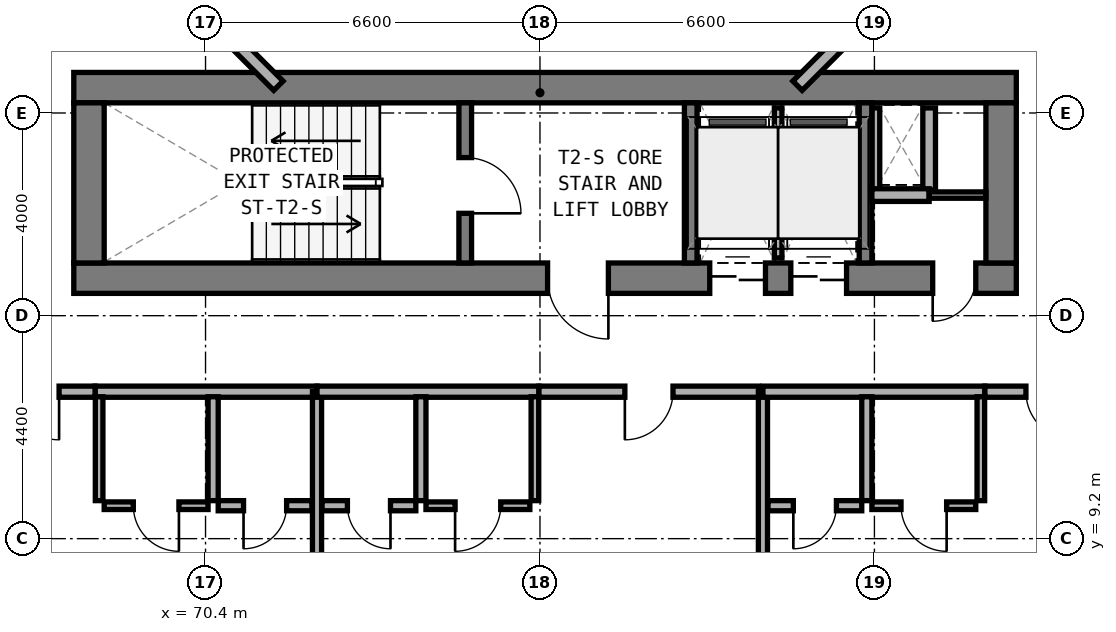
"""IFC4 building model, lengths in metres.
Left out: names, types, materials, properties, quantities, classifications, styles, units other than length and angle.
Written with IfcOpenShell. Run it as: python <this file> out.ifc"""

import sys

from ifc_helpers import new_model, si_unit, direction, frame, frame_2d, origin, place, context, subcontext, project, spatial, rectangle, extrude, element, fill, save


model = new_model("IFC4")
c1 = context("Model", 3, precision=1e-05, world=origin(), true_north=direction((0.0, 1.0)))
c2 = subcontext(c1, "Body", "Model", "MODEL_VIEW")
j1 = project(units=[si_unit("LENGTHUNIT", "METRE"), si_unit("PLANEANGLEUNIT", "RADIAN")], contexts=[c1])
p1 = place(None, origin())
s1 = spatial("IfcSite", under=j1, at=p1, CompositionType="ELEMENT")
p2 = place(p1, origin())
s2 = spatial("IfcBuilding", under=s1, at=p2, CompositionType="ELEMENT")
p3 = place(p2, frame((0.0, 0.0, 38.0)))
s3 = spatial("IfcBuildingStorey", under=s2, at=p3, CompositionType="ELEMENT", Elevation=38.0)
p4 = place(p3, frame((67.8, 14.34, 0.0), z_axis=(0.0, 0.0, 1.0), x_axis=(1.0, 0.0, 0.0)))
e1 = element("IfcWall", 1, at=p4, inside=s3, PredefinedType="SHEAR", context=c2, shape_type="SweptSolid", body=[
    extrude(rectangle(XDim=18.6, YDim=0.6, at=frame_2d((9.3, 0.0))), origin(), (0.0, 0.0, 1.0), 3.5),
])
p5 = place(p4, frame((9.35, 0.0, 0.0)))
e2 = element("IfcOpeningElement", 2, at=p5, cuts=e1, PredefinedType="OPENING", context=c2, shape_type="SweptSolid", body=[
    extrude(rectangle(XDim=1.2, YDim=2.15, at=frame_2d((0.6, 1.075))), frame((0.0, 0.31, 0.0), z_axis=(0.0, -1.0, 0.0), x_axis=(1.0, 0.0, 0.0)), (0.0, 0.0, 1.0), 0.62),
])
p6 = place(p4, frame((16.95, 0.0, 0.0)))
e3 = element("IfcOpeningElement", 3, at=p6, cuts=e1, PredefinedType="OPENING", context=c2, shape_type="SweptSolid", body=[
    extrude(rectangle(XDim=0.85, YDim=2.1, at=frame_2d((0.425, 1.05))), frame((0.0, 0.31, 0.0), z_axis=(0.0, -1.0, 0.0), x_axis=(1.0, 0.0, 0.0)), (0.0, 0.0, 1.0), 0.62),
])
p7 = place(p4, frame((12.55, 0.0, 0.0)))
e4 = element("IfcOpeningElement", 4, at=p7, cuts=e1, PredefinedType="OPENING", context=c2, shape_type="SweptSolid", body=[
    extrude(rectangle(XDim=1.1, YDim=2.15, at=frame_2d((0.55, 1.075))), frame((0.0, 0.31, 0.0), z_axis=(0.0, -1.0, 0.0), x_axis=(1.0, 0.0, 0.0)), (0.0, 0.0, 1.0), 0.62),
])
p8 = place(p4, frame((14.15, 0.0, 0.0)))
e5 = element("IfcOpeningElement", 5, at=p8, cuts=e1, PredefinedType="OPENING", context=c2, shape_type="SweptSolid", body=[
    extrude(rectangle(XDim=1.1, YDim=2.15, at=frame_2d((0.55, 1.075))), frame((0.0, 0.31, 0.0), z_axis=(0.0, -1.0, 0.0), x_axis=(1.0, 0.0, 0.0)), (0.0, 0.0, 1.0), 0.62),
])
p9 = place(p3, frame((67.8, 18.1, 0.0), z_axis=(0.0, 0.0, 1.0), x_axis=(1.0, 0.0, 0.0)))
e6 = element("IfcWall", 6, at=p9, inside=s3, PredefinedType="SHEAR", context=c2, shape_type="SweptSolid", body=[
    extrude(rectangle(XDim=18.6, YDim=0.6, at=frame_2d((9.3, 0.0))), origin(), (0.0, 0.0, 1.0), 3.5),
])
for number, where, z_axis, x_axis in (
    (7, (68.1, 14.64, 0.0), (0.0, 0.0, 1.0), (0.0, 1.0, 0.0)),
    (8, (86.1, 14.64, 0.0), (0.0, 0.0, 1.0), (0.0, 1.0, 0.0)),
):
    element("IfcWall", number, at=place(p3, frame(where, z_axis=z_axis, x_axis=x_axis)), inside=s3, PredefinedType="SHEAR", context=c2, shape_type="SweptSolid", body=[
        extrude(rectangle(XDim=3.16, YDim=0.6, at=frame_2d((1.58, 0.0))), origin(), (0.0, 0.0, 1.0), 3.5),
    ])
p10 = place(p3, frame((75.525, 14.64, 0.0), z_axis=(0.0, 0.0, 1.0), x_axis=(0.0, 1.0, 0.0)))
e9 = element("IfcWall", 9, at=p10, inside=s3, PredefinedType="STANDARD", context=c2, shape_type="SweptSolid", body=[
    extrude(rectangle(XDim=3.16, YDim=0.25, at=frame_2d((1.58, 0.0))), origin(), (0.0, 0.0, 1.0), 3.25),
])
p11 = place(p10, frame((0.98, 0.0, 0.0)))
e10 = element("IfcOpeningElement", 10, at=p11, cuts=e9, PredefinedType="OPENING", context=c2, shape_type="SweptSolid", body=[
    extrude(rectangle(XDim=1.1, YDim=2.15, at=frame_2d((0.55, 1.075))), frame((0.0, 0.135, 0.0), z_axis=(0.0, -1.0, 0.0), x_axis=(1.0, 0.0, 0.0)), (0.0, 0.0, 1.0), 0.27),
])
for number, where, z_axis, x_axis in (
    (11, (79.975, 14.64, 0.0), (0.0, 0.0, 1.0), (0.0, 1.0, 0.0)),
    (12, (83.425, 14.64, 0.0), (0.0, 0.0, 1.0), (0.0, 1.0, 0.0)),
):
    element("IfcWall", number, at=place(p3, frame(where, z_axis=z_axis, x_axis=x_axis)), inside=s3, PredefinedType="STANDARD", context=c2, shape_type="SweptSolid", body=[
        extrude(rectangle(XDim=3.16, YDim=0.25, at=frame_2d((1.58, 0.0))), origin(), (0.0, 0.0, 1.0), 3.25),
    ])
for number, where, z_axis, x_axis in (
    (13, (82.082, 18.138, 0.0), (0.0, 0.0, 1.0), (0.707, 0.707, 0.0)),
    (14, (70.204, 19.772, 0.0), (0.0, 0.0, 1.0), (0.707, -0.707, 0.0)),
):
    element("IfcWall", number, at=place(p3, frame(where, z_axis=z_axis, x_axis=x_axis)), inside=s3, PredefinedType="STANDARD", context=c2, shape_type="SweptSolid", body=[
        extrude(rectangle(XDim=2.311, YDim=0.26, at=frame_2d((1.155, 0.0))), origin(), (0.0, 0.0, 1.0), 3.25),
    ])
p12 = place(p3, frame((83.63, 16.08, 0.0), z_axis=(0.0, 0.0, 1.0), x_axis=(0.0, 1.0, 0.0)))
e15 = element("IfcWall", 15, at=p12, inside=s3, PredefinedType="PARTITIONING", context=c2, shape_type="SweptSolid", body=[
    extrude(rectangle(XDim=1.62, YDim=0.15, at=frame_2d((0.81, 0.0))), origin(), (0.0, 0.0, 1.0), 2.725),
])
p13 = place(p3, frame((84.68, 16.08, 0.0), z_axis=(0.0, 0.0, 1.0), x_axis=(0.0, 1.0, 0.0)))
e16 = element("IfcWall", 16, at=p13, inside=s3, PredefinedType="SOLIDWALL", context=c2, shape_type="SweptSolid", body=[
    extrude(rectangle(XDim=1.62, YDim=0.25, at=frame_2d((0.81, 0.0))), origin(), (0.0, 0.0, 1.0), 3.22),
])
p14 = place(p3, frame((83.55, 15.98, 0.0), z_axis=(0.0, 0.0, 1.0), x_axis=(1.0, 0.0, 0.0)))
e17 = element("IfcWall", 17, at=p14, inside=s3, PredefinedType="SOLIDWALL", context=c2, shape_type="SweptSolid", body=[
    extrude(rectangle(XDim=1.13, YDim=0.25, at=frame_2d((0.565, 0.0))), origin(), (0.0, 0.0, 1.0), 3.22),
])
p15 = place(p3, frame((84.68, 15.98, 0.0), z_axis=(0.0, 0.0, 1.0), x_axis=(1.0, 0.0, 0.0)))
e18 = element("IfcWall", 18, at=p15, inside=s3, PredefinedType="PARTITIONING", context=c2, shape_type="SweptSolid", body=[
    extrude(rectangle(XDim=1.12, YDim=0.125, at=frame_2d((0.56, 0.0))), origin(), (0.0, 0.0, 1.0), 3.22),
])
p16 = place(p3, frame((81.7, 14.74, 0.0), z_axis=(0.0, 0.0, 1.0), x_axis=(0.0, 1.0, 0.0)))
e19 = element("IfcWall", 19, at=p16, inside=s3, PredefinedType="PARTITIONING", context=c2, shape_type="SweptSolid", body=[
    extrude(rectangle(XDim=2.96, YDim=0.15, at=frame_2d((1.48, 0.0))), origin(), (0.0, 0.0, 1.0), 3.22),
])
p17 = place(p3, frame((68.22, 12.1, 0.0), z_axis=(0.0, 0.0, 1.0), x_axis=(1.0, 0.0, 0.0)))
e20 = element("IfcWall", 20, at=p17, inside=s3, PredefinedType="SOLIDWALL", context=c2, shape_type="SweptSolid", body=[
    extrude(rectangle(XDim=4.38, YDim=0.22, at=frame_2d((2.19, 0.0))), origin(), (0.0, 0.0, 1.0), 2.725),
])
p18 = place(p3, frame((65.85, 12.1, 0.0), z_axis=(0.0, 0.0, 1.0), x_axis=(1.0, 0.0, 0.0)))
e21 = element("IfcWall", 21, at=p18, inside=s3, PredefinedType="SOLIDWALL", context=c2, shape_type="SweptSolid", body=[
    extrude(rectangle(XDim=2.37, YDim=0.22, at=frame_2d((1.185, 0.0))), origin(), (0.0, 0.0, 1.0), 3.22),
])
p19 = place(p18, frame((0.71, 0.0, 0.0)))
e22 = element("IfcOpeningElement", 22, at=p19, cuts=e21, PredefinedType="OPENING", context=c2, shape_type="SweptSolid", body=[
    extrude(rectangle(XDim=0.95, YDim=2.1, at=frame_2d((0.475, 1.05))), frame((0.0, 0.12, 0.0), z_axis=(0.0, -1.0, 0.0), x_axis=(1.0, 0.0, 0.0)), (0.0, 0.0, 1.0), 0.24),
])
p20 = place(p3, frame((70.55, 9.95, 0.0), z_axis=(0.0, 0.0, 1.0), x_axis=(0.0, 1.0, 0.0)))
e23 = element("IfcWall", 23, at=p20, inside=s3, PredefinedType="PLUMBINGWALL", context=c2, shape_type="SweptSolid", body=[
    extrude(rectangle(XDim=2.05, YDim=0.2, at=frame_2d((1.025, 0.0))), origin(), (0.0, 0.0, 1.0), 3.22),
])
p21 = place(p3, frame((68.3, 9.95, 0.0), z_axis=(0.0, 0.0, 1.0), x_axis=(0.0, 1.0, 0.0)))
e24 = element("IfcWall", 24, at=p21, inside=s3, PredefinedType="PARTITIONING", context=c2, shape_type="SweptSolid", body=[
    extrude(rectangle(XDim=2.05, YDim=0.15, at=frame_2d((1.025, 0.0))), origin(), (0.0, 0.0, 1.0), 3.22),
])
p22 = place(p3, frame((70.65, 9.85, 0.0), z_axis=(0.0, 0.0, 1.0), x_axis=(1.0, 0.0, 0.0)))
e25 = element("IfcWall", 25, at=p22, inside=s3, PredefinedType="PLUMBINGWALL", context=c2, shape_type="SweptSolid", body=[
    extrude(rectangle(XDim=1.85, YDim=0.2, at=frame_2d((0.925, 0.0))), origin(), (0.0, 0.0, 1.0), 3.22),
])
p23 = place(p22, frame((0.5, 0.0, 0.0)))
e26 = element("IfcOpeningElement", 26, at=p23, cuts=e25, PredefinedType="OPENING", context=c2, shape_type="SweptSolid", body=[
    extrude(rectangle(XDim=0.85, YDim=2.1, at=frame_2d((0.425, 1.05))), frame((0.0, 0.11, 0.0), z_axis=(0.0, -1.0, 0.0), x_axis=(1.0, 0.0, 0.0)), (0.0, 0.0, 1.0), 0.22),
])
p24 = place(p3, frame((68.4, 9.85, 0.0), z_axis=(0.0, 0.0, 1.0), x_axis=(1.0, 0.0, 0.0)))
e27 = element("IfcWall", 27, at=p24, inside=s3, PredefinedType="PARTITIONING", context=c2, shape_type="SweptSolid", body=[
    extrude(rectangle(XDim=2.05, YDim=0.15, at=frame_2d((1.025, 0.0))), origin(), (0.0, 0.0, 1.0), 3.22),
])
p25 = place(p24, frame((0.575, 0.0, 0.0)))
e28 = element("IfcOpeningElement", 28, at=p25, cuts=e27, PredefinedType="OPENING", context=c2, shape_type="SweptSolid", body=[
    extrude(rectangle(XDim=0.9, YDim=2.1, at=frame_2d((0.45, 1.05))), frame((0.0, 0.085, 0.0), z_axis=(0.0, -1.0, 0.0), x_axis=(1.0, 0.0, 0.0)), (0.0, 0.0, 1.0), 0.17),
])
p26 = place(p3, frame((72.6, 5.06, 0.0), z_axis=(0.0, 0.0, 1.0), x_axis=(0.0, 1.0, 0.0)))
e29 = element("IfcWall", 29, at=p26, inside=s3, PredefinedType="SOLIDWALL", context=c2, shape_type="SweptSolid", body=[
    extrude(rectangle(XDim=7.04, YDim=0.18, at=frame_2d((3.52, 0.0))), origin(), (0.0, 0.0, 1.0), 2.725),
])
p27 = place(p3, frame((72.6, 12.1, 0.0), z_axis=(0.0, 0.0, 1.0), x_axis=(1.0, 0.0, 0.0)))
e30 = element("IfcWall", 30, at=p27, inside=s3, PredefinedType="SOLIDWALL", context=c2, shape_type="SweptSolid", body=[
    extrude(rectangle(XDim=4.38, YDim=0.22, at=frame_2d((2.19, 0.0))), origin(), (0.0, 0.0, 1.0), 2.725),
])
p28 = place(p3, frame((76.98, 12.1, 0.0), z_axis=(0.0, 0.0, 1.0), x_axis=(1.0, 0.0, 0.0)))
e31 = element("IfcWall", 31, at=p28, inside=s3, PredefinedType="SOLIDWALL", context=c2, shape_type="SweptSolid", body=[
    extrude(rectangle(XDim=4.34, YDim=0.22, at=frame_2d((2.17, 0.0))), origin(), (0.0, 0.0, 1.0), 2.725),
])
p29 = place(p28, frame((1.695, 0.0, 0.0)))
e32 = element("IfcOpeningElement", 32, at=p29, cuts=e31, PredefinedType="OPENING", context=c2, shape_type="SweptSolid", body=[
    extrude(rectangle(XDim=0.95, YDim=2.1, at=frame_2d((0.475, 1.05))), frame((0.0, 0.12, 0.0), z_axis=(0.0, -1.0, 0.0), x_axis=(1.0, 0.0, 0.0)), (0.0, 0.0, 1.0), 0.24),
])
p30 = place(p3, frame((74.65, 9.95, 0.0), z_axis=(0.0, 0.0, 1.0), x_axis=(0.0, 1.0, 0.0)))
e33 = element("IfcWall", 33, at=p30, inside=s3, PredefinedType="PLUMBINGWALL", context=c2, shape_type="SweptSolid", body=[
    extrude(rectangle(XDim=2.05, YDim=0.2, at=frame_2d((1.025, 0.0))), origin(), (0.0, 0.0, 1.0), 2.895),
])
p31 = place(p3, frame((76.9, 9.95, 0.0), z_axis=(0.0, 0.0, 1.0), x_axis=(0.0, 1.0, 0.0)))
e34 = element("IfcWall", 34, at=p31, inside=s3, PredefinedType="PARTITIONING", context=c2, shape_type="SweptSolid", body=[
    extrude(rectangle(XDim=2.05, YDim=0.15, at=frame_2d((1.025, 0.0))), origin(), (0.0, 0.0, 1.0), 2.895),
])
p32 = place(p3, frame((72.7, 9.85, 0.0), z_axis=(0.0, 0.0, 1.0), x_axis=(1.0, 0.0, 0.0)))
e35 = element("IfcWall", 35, at=p32, inside=s3, PredefinedType="PLUMBINGWALL", context=c2, shape_type="SweptSolid", body=[
    extrude(rectangle(XDim=1.85, YDim=0.2, at=frame_2d((0.925, 0.0))), origin(), (0.0, 0.0, 1.0), 3.22),
])
p33 = place(p32, frame((0.5, 0.0, 0.0)))
e36 = element("IfcOpeningElement", 36, at=p33, cuts=e35, PredefinedType="OPENING", context=c2, shape_type="SweptSolid", body=[
    extrude(rectangle(XDim=0.85, YDim=2.1, at=frame_2d((0.425, 1.05))), frame((0.0, 0.11, 0.0), z_axis=(0.0, -1.0, 0.0), x_axis=(1.0, 0.0, 0.0)), (0.0, 0.0, 1.0), 0.22),
])
p34 = place(p3, frame((74.75, 9.85, 0.0), z_axis=(0.0, 0.0, 1.0), x_axis=(1.0, 0.0, 0.0)))
e37 = element("IfcWall", 37, at=p34, inside=s3, PredefinedType="PARTITIONING", context=c2, shape_type="SweptSolid", body=[
    extrude(rectangle(XDim=2.05, YDim=0.15, at=frame_2d((1.025, 0.0))), origin(), (0.0, 0.0, 1.0), 3.22),
])
p35 = place(p34, frame((0.575, 0.0, 0.0)))
e38 = element("IfcOpeningElement", 38, at=p35, cuts=e37, PredefinedType="OPENING", context=c2, shape_type="SweptSolid", body=[
    extrude(rectangle(XDim=0.9, YDim=2.1, at=frame_2d((0.45, 1.05))), frame((0.0, 0.085, 0.0), z_axis=(0.0, -1.0, 0.0), x_axis=(1.0, 0.0, 0.0)), (0.0, 0.0, 1.0), 0.17),
])
p36 = place(p3, frame((81.4, 5.06, 0.0), z_axis=(0.0, 0.0, 1.0), x_axis=(0.0, 1.0, 0.0)))
e39 = element("IfcWall", 39, at=p36, inside=s3, PredefinedType="SOLIDWALL", context=c2, shape_type="SweptSolid", body=[
    extrude(rectangle(XDim=7.04, YDim=0.18, at=frame_2d((3.52, 0.0))), origin(), (0.0, 0.0, 1.0), 2.725),
])
p37 = place(p3, frame((81.4, 12.1, 0.0), z_axis=(0.0, 0.0, 1.0), x_axis=(1.0, 0.0, 0.0)))
e40 = element("IfcWall", 40, at=p37, inside=s3, PredefinedType="SOLIDWALL", context=c2, shape_type="SweptSolid", body=[
    extrude(rectangle(XDim=4.38, YDim=0.22, at=frame_2d((2.19, 0.0))), origin(), (0.0, 0.0, 1.0), 2.725),
])
p38 = place(p3, frame((85.78, 12.1, 0.0), z_axis=(0.0, 0.0, 1.0), x_axis=(1.0, 0.0, 0.0)))
e41 = element("IfcWall", 41, at=p38, inside=s3, PredefinedType="SOLIDWALL", context=c2, shape_type="SweptSolid", body=[
    extrude(rectangle(XDim=2.57, YDim=0.22, at=frame_2d((1.285, 0.0))), origin(), (0.0, 0.0, 1.0), 3.22),
])
p39 = place(p38, frame((0.81, 0.0, 0.0)))
e42 = element("IfcOpeningElement", 42, at=p39, cuts=e41, PredefinedType="OPENING", context=c2, shape_type="SweptSolid", body=[
    extrude(rectangle(XDim=0.95, YDim=2.1, at=frame_2d((0.475, 1.05))), frame((0.0, 0.12, 0.0), z_axis=(0.0, -1.0, 0.0), x_axis=(1.0, 0.0, 0.0)), (0.0, 0.0, 1.0), 0.24),
])
p40 = place(p3, frame((83.45, 9.95, 0.0), z_axis=(0.0, 0.0, 1.0), x_axis=(0.0, 1.0, 0.0)))
e43 = element("IfcWall", 43, at=p40, inside=s3, PredefinedType="PLUMBINGWALL", context=c2, shape_type="SweptSolid", body=[
    extrude(rectangle(XDim=2.05, YDim=0.2, at=frame_2d((1.025, 0.0))), origin(), (0.0, 0.0, 1.0), 3.22),
])
p41 = place(p3, frame((85.7, 9.95, 0.0), z_axis=(0.0, 0.0, 1.0), x_axis=(0.0, 1.0, 0.0)))
e44 = element("IfcWall", 44, at=p41, inside=s3, PredefinedType="PARTITIONING", context=c2, shape_type="SweptSolid", body=[
    extrude(rectangle(XDim=2.05, YDim=0.15, at=frame_2d((1.025, 0.0))), origin(), (0.0, 0.0, 1.0), 3.22),
])
p42 = place(p3, frame((81.5, 9.85, 0.0), z_axis=(0.0, 0.0, 1.0), x_axis=(1.0, 0.0, 0.0)))
e45 = element("IfcWall", 45, at=p42, inside=s3, PredefinedType="PLUMBINGWALL", context=c2, shape_type="SweptSolid", body=[
    extrude(rectangle(XDim=1.85, YDim=0.2, at=frame_2d((0.925, 0.0))), origin(), (0.0, 0.0, 1.0), 2.725),
])
p43 = place(p42, frame((0.5, 0.0, 0.0)))
e46 = element("IfcOpeningElement", 46, at=p43, cuts=e45, PredefinedType="OPENING", context=c2, shape_type="SweptSolid", body=[
    extrude(rectangle(XDim=0.85, YDim=2.1, at=frame_2d((0.425, 1.05))), frame((0.0, 0.11, 0.0), z_axis=(0.0, -1.0, 0.0), x_axis=(1.0, 0.0, 0.0)), (0.0, 0.0, 1.0), 0.22),
])
p44 = place(p3, frame((83.55, 9.85, 0.0), z_axis=(0.0, 0.0, 1.0), x_axis=(1.0, 0.0, 0.0)))
e47 = element("IfcWall", 47, at=p44, inside=s3, PredefinedType="PARTITIONING", context=c2, shape_type="SweptSolid", body=[
    extrude(rectangle(XDim=2.05, YDim=0.15, at=frame_2d((1.025, 0.0))), origin(), (0.0, 0.0, 1.0), 3.22),
])
p45 = place(p44, frame((0.575, 0.0, 0.0)))
e48 = element("IfcOpeningElement", 48, at=p45, cuts=e47, PredefinedType="OPENING", context=c2, shape_type="SweptSolid", body=[
    extrude(rectangle(XDim=0.9, YDim=2.1, at=frame_2d((0.45, 1.05))), frame((0.0, 0.085, 0.0), z_axis=(0.0, -1.0, 0.0), x_axis=(1.0, 0.0, 0.0)), (0.0, 0.0, 1.0), 0.17),
])
p46 = place(p11, frame((1.1, 0.0, 0.0), z_axis=(0.0, 0.0, 1.0), x_axis=(-1.0, 0.0, 0.0)))
e49 = element("IfcDoor", 49, at=p46, inside=s3, OperationType="SINGLE_SWING_RIGHT", PredefinedType="DOOR", context=c2, shape_type="SweptSolid", body=[
    extrude(rectangle(XDim=1.1, YDim=2.15, at=frame_2d((0.55, 1.075))), frame((0.0, 0.025, 0.0), z_axis=(0.0, -1.0, 0.0), x_axis=(1.0, 0.0, 0.0)), (0.0, 0.0, 1.0), 0.05),
])
fill(e10, e49)
p47 = place(p5, frame((1.2, 0.0, 0.0), z_axis=(0.0, 0.0, 1.0), x_axis=(-1.0, 0.0, 0.0)))
e50 = element("IfcDoor", 50, at=p47, inside=s3, OperationType="SINGLE_SWING_LEFT", PredefinedType="DOOR", context=c2, shape_type="SweptSolid", body=[
    extrude(rectangle(XDim=1.2, YDim=2.15, at=frame_2d((0.6, 1.075))), frame((0.0, 0.025, 0.0), z_axis=(0.0, -1.0, 0.0), x_axis=(1.0, 0.0, 0.0)), (0.0, 0.0, 1.0), 0.05),
])
fill(e2, e50)
p48 = place(p6, frame((0.85, 0.0, 0.0), z_axis=(0.0, 0.0, 1.0), x_axis=(-1.0, 0.0, 0.0)))
e51 = element("IfcDoor", 51, at=p48, inside=s3, OperationType="SINGLE_SWING_RIGHT", PredefinedType="DOOR", context=c2, shape_type="SweptSolid", body=[
    extrude(rectangle(XDim=0.85, YDim=2.1, at=frame_2d((0.425, 1.05))), frame((0.0, 0.025, 0.0), z_axis=(0.0, -1.0, 0.0), x_axis=(1.0, 0.0, 0.0)), (0.0, 0.0, 1.0), 0.05),
])
fill(e3, e51)
p49 = place(p7, frame((1.1, 0.0, 0.0), z_axis=(0.0, 0.0, 1.0), x_axis=(-1.0, 0.0, 0.0)))
e52 = element("IfcDoor", 52, at=p49, inside=s3, OperationType="DOUBLE_DOOR_SLIDING", PredefinedType="DOOR", context=c2, shape_type="SweptSolid", body=[
    extrude(rectangle(XDim=1.1, YDim=2.15, at=frame_2d((0.55, 1.075))), frame((0.0, 0.025, 0.0), z_axis=(0.0, -1.0, 0.0), x_axis=(1.0, 0.0, 0.0)), (0.0, 0.0, 1.0), 0.05),
])
fill(e4, e52)
p50 = place(p8, frame((1.1, 0.0, 0.0), z_axis=(0.0, 0.0, 1.0), x_axis=(-1.0, 0.0, 0.0)))
e53 = element("IfcDoor", 53, at=p50, inside=s3, OperationType="DOUBLE_DOOR_SLIDING", PredefinedType="DOOR", context=c2, shape_type="SweptSolid", body=[
    extrude(rectangle(XDim=1.1, YDim=2.15, at=frame_2d((0.55, 1.075))), frame((0.0, 0.025, 0.0), z_axis=(0.0, -1.0, 0.0), x_axis=(1.0, 0.0, 0.0)), (0.0, 0.0, 1.0), 0.05),
])
fill(e5, e53)
p51 = place(p19, frame((0.95, 0.0, 0.0), z_axis=(0.0, 0.0, 1.0), x_axis=(-1.0, 0.0, 0.0)))
e54 = element("IfcDoor", 54, at=p51, inside=s3, OperationType="SINGLE_SWING_LEFT", PredefinedType="DOOR", context=c2, shape_type="SweptSolid", body=[
    extrude(rectangle(XDim=0.95, YDim=2.1, at=frame_2d((0.475, 1.05))), frame((0.0, 0.025, 0.0), z_axis=(0.0, -1.0, 0.0), x_axis=(1.0, 0.0, 0.0)), (0.0, 0.0, 1.0), 0.05),
])
fill(e22, e54)
p52 = place(p23, frame((0.85, 0.0, 0.0), z_axis=(0.0, 0.0, 1.0), x_axis=(-1.0, 0.0, 0.0)))
e55 = element("IfcDoor", 55, at=p52, inside=s3, OperationType="SINGLE_SWING_RIGHT", PredefinedType="DOOR", context=c2, shape_type="SweptSolid", body=[
    extrude(rectangle(XDim=0.85, YDim=2.1, at=frame_2d((0.425, 1.05))), frame((0.0, 0.025, 0.0), z_axis=(0.0, -1.0, 0.0), x_axis=(1.0, 0.0, 0.0)), (0.0, 0.0, 1.0), 0.05),
])
fill(e26, e55)
p53 = place(p25, frame((0.9, 0.0, 0.0), z_axis=(0.0, 0.0, 1.0), x_axis=(-1.0, 0.0, 0.0)))
e56 = element("IfcDoor", 56, at=p53, inside=s3, OperationType="SINGLE_SWING_LEFT", PredefinedType="DOOR", context=c2, shape_type="SweptSolid", body=[
    extrude(rectangle(XDim=0.9, YDim=2.1, at=frame_2d((0.45, 1.05))), frame((0.0, 0.025, 0.0), z_axis=(0.0, -1.0, 0.0), x_axis=(1.0, 0.0, 0.0)), (0.0, 0.0, 1.0), 0.05),
])
fill(e28, e56)
p54 = place(p29, frame((0.95, 0.0, 0.0), z_axis=(0.0, 0.0, 1.0), x_axis=(-1.0, 0.0, 0.0)))
e57 = element("IfcDoor", 57, at=p54, inside=s3, OperationType="SINGLE_SWING_RIGHT", PredefinedType="DOOR", context=c2, shape_type="SweptSolid", body=[
    extrude(rectangle(XDim=0.95, YDim=2.1, at=frame_2d((0.475, 1.05))), frame((0.0, 0.025, 0.0), z_axis=(0.0, -1.0, 0.0), x_axis=(1.0, 0.0, 0.0)), (0.0, 0.0, 1.0), 0.05),
])
fill(e32, e57)
p55 = place(p33, frame((0.85, 0.0, 0.0), z_axis=(0.0, 0.0, 1.0), x_axis=(-1.0, 0.0, 0.0)))
e58 = element("IfcDoor", 58, at=p55, inside=s3, OperationType="SINGLE_SWING_LEFT", PredefinedType="DOOR", context=c2, shape_type="SweptSolid", body=[
    extrude(rectangle(XDim=0.85, YDim=2.1, at=frame_2d((0.425, 1.05))), frame((0.0, 0.025, 0.0), z_axis=(0.0, -1.0, 0.0), x_axis=(1.0, 0.0, 0.0)), (0.0, 0.0, 1.0), 0.05),
])
fill(e36, e58)
p56 = place(p35, frame((0.9, 0.0, 0.0), z_axis=(0.0, 0.0, 1.0), x_axis=(-1.0, 0.0, 0.0)))
e59 = element("IfcDoor", 59, at=p56, inside=s3, OperationType="SINGLE_SWING_RIGHT", PredefinedType="DOOR", context=c2, shape_type="SweptSolid", body=[
    extrude(rectangle(XDim=0.9, YDim=2.1, at=frame_2d((0.45, 1.05))), frame((0.0, 0.025, 0.0), z_axis=(0.0, -1.0, 0.0), x_axis=(1.0, 0.0, 0.0)), (0.0, 0.0, 1.0), 0.05),
])
fill(e38, e59)
p57 = place(p39, frame((0.95, 0.0, 0.0), z_axis=(0.0, 0.0, 1.0), x_axis=(-1.0, 0.0, 0.0)))
e60 = element("IfcDoor", 60, at=p57, inside=s3, OperationType="SINGLE_SWING_LEFT", PredefinedType="DOOR", context=c2, shape_type="SweptSolid", body=[
    extrude(rectangle(XDim=0.95, YDim=2.1, at=frame_2d((0.475, 1.05))), frame((0.0, 0.025, 0.0), z_axis=(0.0, -1.0, 0.0), x_axis=(1.0, 0.0, 0.0)), (0.0, 0.0, 1.0), 0.05),
])
fill(e42, e60)
p58 = place(p43, frame((0.85, 0.0, 0.0), z_axis=(0.0, 0.0, 1.0), x_axis=(-1.0, 0.0, 0.0)))
e61 = element("IfcDoor", 61, at=p58, inside=s3, OperationType="SINGLE_SWING_RIGHT", PredefinedType="DOOR", context=c2, shape_type="SweptSolid", body=[
    extrude(rectangle(XDim=0.85, YDim=2.1, at=frame_2d((0.425, 1.05))), frame((0.0, 0.025, 0.0), z_axis=(0.0, -1.0, 0.0), x_axis=(1.0, 0.0, 0.0)), (0.0, 0.0, 1.0), 0.05),
])
fill(e46, e61)
p59 = place(p45, frame((0.9, 0.0, 0.0), z_axis=(0.0, 0.0, 1.0), x_axis=(-1.0, 0.0, 0.0)))
e62 = element("IfcDoor", 62, at=p59, inside=s3, OperationType="SINGLE_SWING_LEFT", PredefinedType="DOOR", context=c2, shape_type="SweptSolid", body=[
    extrude(rectangle(XDim=0.9, YDim=2.1, at=frame_2d((0.45, 1.05))), frame((0.0, 0.025, 0.0), z_axis=(0.0, -1.0, 0.0), x_axis=(1.0, 0.0, 0.0)), (0.0, 0.0, 1.0), 0.05),
])
fill(e48, e62)
save(model, sys.argv[1])
